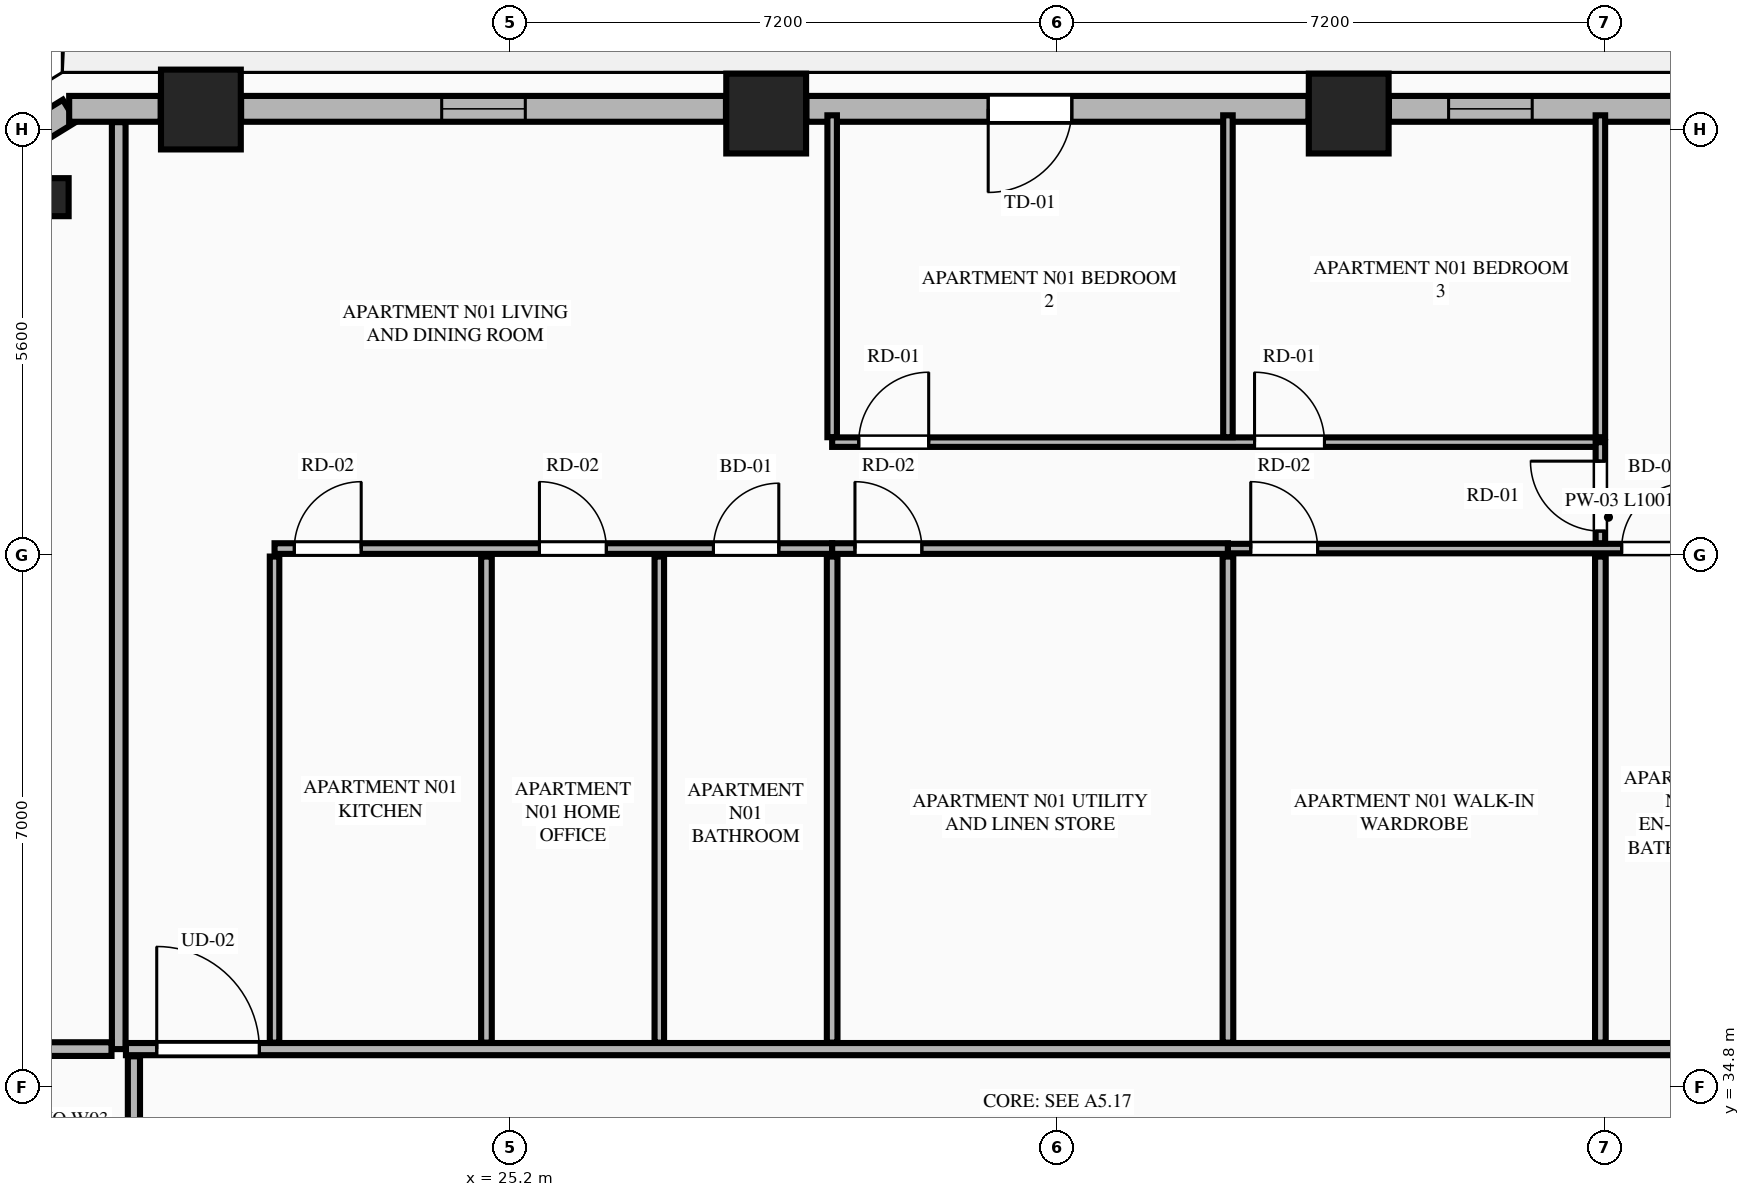
"""IFC4 building model, lengths in metres.
Left out: names, types, materials, properties, quantities, classifications, styles, units other than length and angle.
Written with IfcOpenShell. Run it as: python <this file> out.ifc"""

import sys

from ifc_helpers import new_model, si_unit, direction, frame, frame_2d, origin, origin_2d, place, context, subcontext, project, spatial, rectangle, extrude, element, fill, save


model = new_model("IFC4")
c1 = context("Model", 3, precision=1e-05, world=origin(), true_north=direction((0.0, 1.0)))
c2 = subcontext(c1, "Body", "Model", "MODEL_VIEW")
j1 = project(units=[si_unit("LENGTHUNIT", "METRE"), si_unit("PLANEANGLEUNIT", "RADIAN")], contexts=[c1])
p1 = place(None, origin())
s1 = spatial("IfcSite", under=j1, at=p1, CompositionType="ELEMENT")
p2 = place(p1, origin())
s2 = spatial("IfcBuilding", under=s1, at=p2, CompositionType="ELEMENT")
p3 = place(p2, frame((0.0, 0.0, 112.6)))
s3 = spatial("IfcBuildingStorey", under=s2, at=p3, CompositionType="ELEMENT", Elevation=112.6)
for number, where, z_axis, x_axis in (
    (1, (36.232, 47.608, 0.0), (0.0, 0.0, 1.0), (1.0, 0.0, 0.0)),
    (2, (28.568, 47.608, 0.0), (0.0, 0.0, 1.0), (1.0, 0.0, 0.0)),
    (3, (21.131, 47.661, 0.0), (0.0, 0.0, 1.0), (1.0, 0.0, 0.0)),
):
    element("IfcColumn", number, at=place(p3, frame(where, z_axis=z_axis, x_axis=x_axis)), inside=s3, PredefinedType="COLUMN", context=c2, shape_type="SweptSolid", body=[
        extrude(rectangle(XDim=1.05, YDim=1.05, at=origin_2d()), origin(), (0.0, 0.0, 1.0), 3.55),
    ])
p4 = place(p3, frame((19.141, 46.508, 0.0), z_axis=(0.0, 0.0, 1.0), x_axis=(-0.865160173452, -0.501495637342, 0.0)))
e4 = element("IfcColumn", 4, at=p4, inside=s3, PredefinedType="PILASTER", context=c2, shape_type="SweptSolid", body=[
    extrude(rectangle(XDim=0.5, YDim=0.35, at=origin_2d()), origin(), (0.0, 0.0, 1.0), 3.55),
])
p5 = place(p3, frame((19.403, 47.645, 0.0), z_axis=(0.0, 0.0, 1.0), x_axis=(-0.851798915137, -0.523868884523, 0.0)))
e5 = element("IfcWall", 5, at=p5, inside=s3, PredefinedType="STANDARD", context=c2, shape_type="SweptSolid", body=[
    extrude(rectangle(XDim=1.848, YDim=0.34, at=frame_2d((0.924, 0.0))), origin(), (0.0, 0.0, 1.0), 3.34),
])
p6 = place(p3, frame((43.14, 47.67, 0.0), z_axis=(0.0, 0.0, 1.0), x_axis=(-1.0, 0.0, 0.0)))
e6 = element("IfcWall", 6, at=p6, inside=s3, PredefinedType="STANDARD", context=c2, shape_type="SweptSolid", body=[
    extrude(rectangle(XDim=6.379, YDim=0.34, at=frame_2d((3.189, 0.0))), origin(), (0.0, 0.0, 1.0), 2.797),
])
p7 = place(p6, frame((1.192, 0.0, 0.75)))
e7 = element("IfcOpeningElement", 7, at=p7, cuts=e6, PredefinedType="OPENING", context=c2, shape_type="SweptSolid", body=[
    extrude(rectangle(XDim=1.1, YDim=1.897, at=frame_2d((0.55, 0.948))), frame((0.0, 0.18, 0.0), z_axis=(0.0, -1.0, 0.0), x_axis=(1.0, 0.0, 0.0)), (0.0, 0.0, 1.0), 0.36),
])
p8 = place(p6, frame((4.494, 0.0, 0.75)))
e8 = element("IfcOpeningElement", 8, at=p8, cuts=e6, PredefinedType="OPENING", context=c2, shape_type="SweptSolid", body=[
    extrude(rectangle(XDim=1.1, YDim=1.897, at=frame_2d((0.55, 0.948))), frame((0.0, 0.18, 0.0), z_axis=(0.0, -1.0, 0.0), x_axis=(1.0, 0.0, 0.0)), (0.0, 0.0, 1.0), 0.36),
])
p9 = place(p3, frame((35.703, 47.67, 0.0), z_axis=(0.0, 0.0, 1.0), x_axis=(-1.0, 0.0, 0.0)))
e9 = element("IfcWall", 9, at=p9, inside=s3, PredefinedType="STANDARD", context=c2, shape_type="SweptSolid", body=[
    extrude(rectangle(XDim=6.606, YDim=0.34, at=frame_2d((3.303, 0.0))), origin(), (0.0, 0.0, 1.0), 2.797),
])
p10 = place(p9, frame((3.114, 0.0, 0.0)))
e10 = element("IfcOpeningElement", 10, at=p10, cuts=e9, PredefinedType="OPENING", context=c2, shape_type="SweptSolid", body=[
    extrude(rectangle(XDim=1.1, YDim=2.25, at=frame_2d((0.55, 1.125))), frame((0.0, 0.18, 0.0), z_axis=(0.0, -1.0, 0.0), x_axis=(1.0, 0.0, 0.0)), (0.0, 0.0, 1.0), 0.36),
])
p11 = place(p3, frame((28.039, 47.67, 0.0), z_axis=(0.0, 0.0, 1.0), x_axis=(-1.0, 0.0, 0.0)))
e11 = element("IfcWall", 11, at=p11, inside=s3, PredefinedType="STANDARD", context=c2, shape_type="SweptSolid", body=[
    extrude(rectangle(XDim=6.379, YDim=0.34, at=frame_2d((3.189, 0.0))), origin(), (0.0, 0.0, 1.0), 2.797),
])
p12 = place(p11, frame((2.64, 0.0, 0.75)))
e12 = element("IfcOpeningElement", 12, at=p12, cuts=e11, PredefinedType="OPENING", context=c2, shape_type="SweptSolid", body=[
    extrude(rectangle(XDim=1.1, YDim=1.897, at=frame_2d((0.55, 0.948))), frame((0.0, 0.18, 0.0), z_axis=(0.0, -1.0, 0.0), x_axis=(1.0, 0.0, 0.0)), (0.0, 0.0, 1.0), 0.36),
])
p13 = place(p3, frame((20.602, 47.67, 0.0), z_axis=(0.0, 0.0, 1.0), x_axis=(-1.0, 0.0, 0.0)))
e13 = element("IfcWall", 13, at=p13, inside=s3, PredefinedType="STANDARD", context=c2, shape_type="SweptSolid", body=[
    extrude(rectangle(XDim=1.204, YDim=0.34, at=frame_2d((0.602, 0.0))), origin(), (0.0, 0.0, 1.0), 3.34),
])
p14 = place(p3, frame((20.05, 35.3, 0.0), z_axis=(0.0, 0.0, 1.0), x_axis=(0.0, 1.0, 0.0)))
e14 = element("IfcWall", 14, at=p14, inside=s3, PredefinedType="PARTITIONING", context=c2, shape_type="SweptSolid", body=[
    extrude(rectangle(XDim=12.195, YDim=0.18, at=frame_2d((6.098, 0.0))), origin(), (0.0, 0.0, 1.0), 3.34),
])
p15 = place(p3, frame((20.145, 35.3, 0.0), z_axis=(0.0, 0.0, 1.0), x_axis=(1.0, 0.0, 0.0)))
e15 = element("IfcWall", 15, at=p15, inside=s3, PredefinedType="PARTITIONING", context=c2, shape_type="SweptSolid", body=[
    extrude(rectangle(XDim=24.51, YDim=0.16, at=frame_2d((12.255, 0.0))), origin(), (0.0, 0.0, 1.0), 3.34),
])
p16 = place(p15, frame((0.405, 0.0, 0.0)))
e16 = element("IfcOpeningElement", 16, at=p16, cuts=e15, PredefinedType="OPENING", context=c2, shape_type="SweptSolid", body=[
    extrude(rectangle(XDim=1.35, YDim=2.35, at=frame_2d((0.675, 1.175))), frame((0.0, 0.09, 0.0), z_axis=(0.0, -1.0, 0.0), x_axis=(1.0, 0.0, 0.0)), (0.0, 0.0, 1.0), 0.18),
])
p17 = place(p3, frame((22.1, 35.385, 0.0), z_axis=(0.0, 0.0, 1.0), x_axis=(0.0, 1.0, 0.0)))
e17 = element("IfcWall", 17, at=p17, inside=s3, PredefinedType="PARTITIONING", context=c2, shape_type="SweptSolid", body=[
    extrude(rectangle(XDim=6.395, YDim=0.125, at=frame_2d((3.198, 0.0))), origin(), (0.0, 0.0, 1.0), 2.722),
])
p18 = place(p3, frame((22.1, 41.885, 0.0), z_axis=(0.0, 0.0, 1.0), x_axis=(1.0, 0.0, 0.0)))
e18 = element("IfcWall", 18, at=p18, inside=s3, PredefinedType="PLUMBINGWALL", context=c2, shape_type="SweptSolid", body=[
    extrude(rectangle(XDim=7.336, YDim=0.14, at=frame_2d((3.668, 0.0))), origin(), (0.0, 0.0, 1.0), 3.34),
])
p19 = place(p18, frame((5.774, 0.0, 0.0)))
e19 = element("IfcOpeningElement", 19, at=p19, cuts=e18, PredefinedType="OPENING", context=c2, shape_type="SweptSolid", body=[
    extrude(rectangle(XDim=0.86, YDim=2.1, at=frame_2d((0.43, 1.05))), frame((0.0, 0.08, 0.0), z_axis=(0.0, -1.0, 0.0), x_axis=(1.0, 0.0, 0.0)), (0.0, 0.0, 1.0), 0.16),
])
p20 = place(p18, frame((0.26, 0.0, 0.0)))
e20 = element("IfcOpeningElement", 20, at=p20, cuts=e18, PredefinedType="OPENING", context=c2, shape_type="SweptSolid", body=[
    extrude(rectangle(XDim=0.88, YDim=2.15, at=frame_2d((0.44, 1.075))), frame((0.0, 0.08, 0.0), z_axis=(0.0, -1.0, 0.0), x_axis=(1.0, 0.0, 0.0)), (0.0, 0.0, 1.0), 0.16),
])
p21 = place(p18, frame((3.485, 0.0, 0.0)))
e21 = element("IfcOpeningElement", 21, at=p21, cuts=e18, PredefinedType="OPENING", context=c2, shape_type="SweptSolid", body=[
    extrude(rectangle(XDim=0.88, YDim=2.15, at=frame_2d((0.44, 1.075))), frame((0.0, 0.08, 0.0), z_axis=(0.0, -1.0, 0.0), x_axis=(1.0, 0.0, 0.0)), (0.0, 0.0, 1.0), 0.16),
])
p22 = place(p3, frame((29.436, 41.885, 0.0), z_axis=(0.0, 0.0, 1.0), x_axis=(1.0, 0.0, 0.0)))
e22 = element("IfcWall", 22, at=p22, inside=s3, PredefinedType="PLUMBINGWALL", context=c2, shape_type="SweptSolid", body=[
    extrude(rectangle(XDim=5.207, YDim=0.14, at=frame_2d((2.604, 0.0))), origin(), (0.0, 0.0, 1.0), 3.34),
])
p23 = place(p22, frame((0.3, 0.0, 0.0)))
e23 = element("IfcOpeningElement", 23, at=p23, cuts=e22, PredefinedType="OPENING", context=c2, shape_type="SweptSolid", body=[
    extrude(rectangle(XDim=0.88, YDim=2.15, at=frame_2d((0.44, 1.075))), frame((0.0, 0.08, 0.0), z_axis=(0.0, -1.0, 0.0), x_axis=(1.0, 0.0, 0.0)), (0.0, 0.0, 1.0), 0.16),
])
p24 = place(p3, frame((34.643, 41.885, 0.0), z_axis=(0.0, 0.0, 1.0), x_axis=(1.0, 0.0, 0.0)))
e24 = element("IfcWall", 24, at=p24, inside=s3, PredefinedType="PARTITIONING", context=c2, shape_type="SweptSolid", body=[
    extrude(rectangle(XDim=10.012, YDim=0.125, at=frame_2d((5.006, 0.0))), origin(), (0.0, 0.0, 1.0), 3.34),
])
p25 = place(p24, frame((5.18, 0.0, 0.0)))
e25 = element("IfcOpeningElement", 25, at=p25, cuts=e24, PredefinedType="OPENING", context=c2, shape_type="SweptSolid", body=[
    extrude(rectangle(XDim=0.86, YDim=2.1, at=frame_2d((0.43, 1.05))), frame((0.0, 0.073, 0.0), z_axis=(0.0, -1.0, 0.0), x_axis=(1.0, 0.0, 0.0)), (0.0, 0.0, 1.0), 0.145),
])
p26 = place(p24, frame((7.328, 0.0, 0.0)))
e26 = element("IfcOpeningElement", 26, at=p26, cuts=e24, PredefinedType="OPENING", context=c2, shape_type="SweptSolid", body=[
    extrude(rectangle(XDim=0.88, YDim=2.15, at=frame_2d((0.44, 1.075))), frame((0.0, 0.073, 0.0), z_axis=(0.0, -1.0, 0.0), x_axis=(1.0, 0.0, 0.0)), (0.0, 0.0, 1.0), 0.145),
])
p27 = place(p24, frame((0.3, 0.0, 0.0)))
e27 = element("IfcOpeningElement", 27, at=p27, cuts=e24, PredefinedType="OPENING", context=c2, shape_type="SweptSolid", body=[
    extrude(rectangle(XDim=0.88, YDim=2.15, at=frame_2d((0.44, 1.075))), frame((0.0, 0.073, 0.0), z_axis=(0.0, -1.0, 0.0), x_axis=(1.0, 0.0, 0.0)), (0.0, 0.0, 1.0), 0.145),
])
p28 = place(p3, frame((24.888, 35.385, 0.0), z_axis=(0.0, 0.0, 1.0), x_axis=(0.0, 1.0, 0.0)))
e28 = element("IfcWall", 28, at=p28, inside=s3, PredefinedType="PLUMBINGWALL", context=c2, shape_type="SweptSolid", body=[
    extrude(rectangle(XDim=6.395, YDim=0.14, at=frame_2d((3.198, 0.0))), origin(), (0.0, 0.0, 1.0), 3.34),
])
p29 = place(p3, frame((27.162, 35.385, 0.0), z_axis=(0.0, 0.0, 1.0), x_axis=(0.0, 1.0, 0.0)))
e29 = element("IfcWall", 29, at=p29, inside=s3, PredefinedType="PARTITIONING", context=c2, shape_type="SweptSolid", body=[
    extrude(rectangle(XDim=6.395, YDim=0.125, at=frame_2d((3.198, 0.0))), origin(), (0.0, 0.0, 1.0), 3.34),
])
p30 = place(p3, frame((29.436, 43.35, 0.0), z_axis=(0.0, 0.0, 1.0), x_axis=(0.0, 1.0, 0.0)))
e30 = element("IfcWall", 30, at=p30, inside=s3, PredefinedType="PARTITIONING", context=c2, shape_type="SweptSolid", body=[
    extrude(rectangle(XDim=4.235, YDim=0.125, at=frame_2d((2.117, 0.0))), origin(), (0.0, 0.0, 1.0), 3.34),
])
p31 = place(p3, frame((29.436, 43.285, 0.0), z_axis=(0.0, 0.0, 1.0), x_axis=(1.0, 0.0, 0.0)))
e31 = element("IfcWall", 31, at=p31, inside=s3, PredefinedType="PARTITIONING", context=c2, shape_type="SweptSolid", body=[
    extrude(rectangle(XDim=10.107, YDim=0.125, at=frame_2d((5.053, 0.0))), origin(), (0.0, 0.0, 1.0), 3.34),
])
p32 = place(p31, frame((0.35, 0.0, 0.0)))
e32 = element("IfcOpeningElement", 32, at=p32, cuts=e31, PredefinedType="OPENING", context=c2, shape_type="SweptSolid", body=[
    extrude(rectangle(XDim=0.92, YDim=2.15, at=frame_2d((0.46, 1.075))), frame((0.0, 0.073, 0.0), z_axis=(0.0, -1.0, 0.0), x_axis=(1.0, 0.0, 0.0)), (0.0, 0.0, 1.0), 0.145),
])
p33 = place(p31, frame((5.557, 0.0, 0.0)))
e33 = element("IfcOpeningElement", 33, at=p33, cuts=e31, PredefinedType="OPENING", context=c2, shape_type="SweptSolid", body=[
    extrude(rectangle(XDim=0.92, YDim=2.15, at=frame_2d((0.46, 1.075))), frame((0.0, 0.073, 0.0), z_axis=(0.0, -1.0, 0.0), x_axis=(1.0, 0.0, 0.0)), (0.0, 0.0, 1.0), 0.145),
])
p34 = place(p3, frame((39.543, 41.955, 0.0), z_axis=(0.0, 0.0, 1.0), x_axis=(0.0, 1.0, 0.0)))
e34 = element("IfcWall", 34, at=p34, inside=s3, PredefinedType="PARTITIONING", context=c2, shape_type="SweptSolid", body=[
    extrude(rectangle(XDim=1.33, YDim=0.125, at=frame_2d((0.665, 0.0))), origin(), (0.0, 0.0, 1.0), 3.34),
])
p35 = place(p34, frame((0.16, 0.0, 0.0)))
e35 = element("IfcOpeningElement", 35, at=p35, cuts=e34, PredefinedType="OPENING", context=c2, shape_type="SweptSolid", body=[
    extrude(rectangle(XDim=0.92, YDim=2.15, at=frame_2d((0.46, 1.075))), frame((0.0, 0.073, 0.0), z_axis=(0.0, -1.0, 0.0), x_axis=(1.0, 0.0, 0.0)), (0.0, 0.0, 1.0), 0.145),
])
for number, where, z_axis, x_axis in (
    (36, (29.436, 35.385, 0.0), (0.0, 0.0, 1.0), (0.0, 1.0, 0.0)),
    (37, (34.643, 35.385, 0.0), (0.0, 0.0, 1.0), (0.0, 1.0, 0.0)),
):
    element("IfcWall", number, at=place(p3, frame(where, z_axis=z_axis, x_axis=x_axis)), inside=s3, PredefinedType="PLUMBINGWALL", context=c2, shape_type="SweptSolid", body=[
        extrude(rectangle(XDim=6.395, YDim=0.14, at=frame_2d((3.198, 0.0))), origin(), (0.0, 0.0, 1.0), 3.34),
    ])
for number, where, z_axis, x_axis in (
    (38, (34.643, 43.35, 0.0), (0.0, 0.0, 1.0), (0.0, 1.0, 0.0)),
    (39, (39.543, 43.35, 0.0), (0.0, 0.0, 1.0), (0.0, 1.0, 0.0)),
):
    element("IfcWall", number, at=place(p3, frame(where, z_axis=z_axis, x_axis=x_axis)), inside=s3, PredefinedType="PARTITIONING", context=c2, shape_type="SweptSolid", body=[
        extrude(rectangle(XDim=4.235, YDim=0.125, at=frame_2d((2.117, 0.0))), origin(), (0.0, 0.0, 1.0), 3.34),
    ])
p36 = place(p3, frame((39.543, 35.385, 0.0), z_axis=(0.0, 0.0, 1.0), x_axis=(0.0, 1.0, 0.0)))
e40 = element("IfcWall", 40, at=p36, inside=s3, PredefinedType="PLUMBINGWALL", context=c2, shape_type="SweptSolid", body=[
    extrude(rectangle(XDim=6.395, YDim=0.14, at=frame_2d((3.198, 0.0))), origin(), (0.0, 0.0, 1.0), 3.34),
])
p37 = place(p3, frame((12.286, 35.3, 0.0), z_axis=(0.0, 0.0, 1.0), x_axis=(1.0, 0.0, 0.0)))
e41 = element("IfcWall", 41, at=p37, inside=s3, PredefinedType="PARTITIONING", context=c2, shape_type="SweptSolid", body=[
    extrude(rectangle(XDim=7.669, YDim=0.18, at=frame_2d((3.834, 0.0))), origin(), (0.0, 0.0, 1.0), 3.34),
])
p38 = place(p3, frame((20.25, 29.379, 0.0), z_axis=(0.0, 0.0, 1.0), x_axis=(0.0, 1.0, 0.0)))
e42 = element("IfcWall", 42, at=p38, inside=s3, PredefinedType="PARTITIONING", context=c2, shape_type="SweptSolid", body=[
    extrude(rectangle(XDim=5.826, YDim=0.16, at=frame_2d((2.913, 0.0))), origin(), (0.0, 0.0, 1.0), 3.34),
])
p39 = place(p38, frame((0.4, 0.0, 0.0)))
e43 = element("IfcOpeningElement", 43, at=p39, cuts=e42, PredefinedType="OPENING", context=c2, shape_type="SweptSolid", body=[
    extrude(rectangle(XDim=1.02, YDim=2.25, at=frame_2d((0.51, 1.125))), frame((0.0, 0.09, 0.0), z_axis=(0.0, -1.0, 0.0), x_axis=(1.0, 0.0, 0.0)), (0.0, 0.0, 1.0), 0.18),
])
p40 = place(p10, origin())
e44 = element("IfcDoor", 44, at=p40, inside=s3, OperationType="SINGLE_SWING_RIGHT", PredefinedType="DOOR", context=c2, shape_type="SweptSolid", body=[
    extrude(rectangle(XDim=1.1, YDim=2.25, at=frame_2d((0.55, 1.125))), frame((0.0, 0.025, 0.0), z_axis=(0.0, -1.0, 0.0), x_axis=(1.0, 0.0, 0.0)), (0.0, 0.0, 1.0), 0.05),
])
fill(e10, e44)
p41 = place(p12, origin())
e45 = element("IfcWindow", 45, at=p41, inside=s3, PartitioningType="SINGLE_PANEL", PredefinedType="WINDOW", context=c2, shape_type="SweptSolid", body=[
    extrude(rectangle(XDim=1.1, YDim=1.897, at=frame_2d((0.55, 0.948))), frame((0.0, 0.03, 0.0), z_axis=(0.0, -1.0, 0.0), x_axis=(1.0, 0.0, 0.0)), (0.0, 0.0, 1.0), 0.06),
])
fill(e12, e45)
p42 = place(p19, origin())
e46 = element("IfcDoor", 46, at=p42, inside=s3, OperationType="SINGLE_SWING_RIGHT", PredefinedType="DOOR", context=c2, shape_type="SweptSolid", body=[
    extrude(rectangle(XDim=0.86, YDim=2.1, at=frame_2d((0.43, 1.05))), frame((0.0, 0.025, 0.0), z_axis=(0.0, -1.0, 0.0), x_axis=(1.0, 0.0, 0.0)), (0.0, 0.0, 1.0), 0.05),
])
fill(e19, e46)
p43 = place(p25, origin())
e47 = element("IfcDoor", 47, at=p43, inside=s3, OperationType="SINGLE_SWING_RIGHT", PredefinedType="DOOR", context=c2, shape_type="SweptSolid", body=[
    extrude(rectangle(XDim=0.86, YDim=2.1, at=frame_2d((0.43, 1.05))), frame((0.0, 0.025, 0.0), z_axis=(0.0, -1.0, 0.0), x_axis=(1.0, 0.0, 0.0)), (0.0, 0.0, 1.0), 0.05),
])
fill(e25, e47)
p44 = place(p16, origin())
e48 = element("IfcDoor", 48, at=p44, inside=s3, OperationType="SINGLE_SWING_LEFT", PredefinedType="DOOR", context=c2, shape_type="SweptSolid", body=[
    extrude(rectangle(XDim=1.35, YDim=2.35, at=frame_2d((0.675, 1.175))), frame((0.0, 0.025, 0.0), z_axis=(0.0, -1.0, 0.0), x_axis=(1.0, 0.0, 0.0)), (0.0, 0.0, 1.0), 0.05),
])
fill(e16, e48)
p45 = place(p20, origin())
e49 = element("IfcDoor", 49, at=p45, inside=s3, OperationType="SINGLE_SWING_RIGHT", PredefinedType="DOOR", context=c2, shape_type="SweptSolid", body=[
    extrude(rectangle(XDim=0.88, YDim=2.15, at=frame_2d((0.44, 1.075))), frame((0.0, 0.025, 0.0), z_axis=(0.0, -1.0, 0.0), x_axis=(1.0, 0.0, 0.0)), (0.0, 0.0, 1.0), 0.05),
])
fill(e20, e49)
p46 = place(p21, origin())
e50 = element("IfcDoor", 50, at=p46, inside=s3, OperationType="SINGLE_SWING_LEFT", PredefinedType="DOOR", context=c2, shape_type="SweptSolid", body=[
    extrude(rectangle(XDim=0.88, YDim=2.15, at=frame_2d((0.44, 1.075))), frame((0.0, 0.025, 0.0), z_axis=(0.0, -1.0, 0.0), x_axis=(1.0, 0.0, 0.0)), (0.0, 0.0, 1.0), 0.05),
])
fill(e21, e50)
p47 = place(p23, origin())
e51 = element("IfcDoor", 51, at=p47, inside=s3, OperationType="SINGLE_SWING_LEFT", PredefinedType="DOOR", context=c2, shape_type="SweptSolid", body=[
    extrude(rectangle(XDim=0.88, YDim=2.15, at=frame_2d((0.44, 1.075))), frame((0.0, 0.025, 0.0), z_axis=(0.0, -1.0, 0.0), x_axis=(1.0, 0.0, 0.0)), (0.0, 0.0, 1.0), 0.05),
])
fill(e23, e51)
p48 = place(p32, origin())
e52 = element("IfcDoor", 52, at=p48, inside=s3, OperationType="SINGLE_SWING_RIGHT", PredefinedType="DOOR", context=c2, shape_type="SweptSolid", body=[
    extrude(rectangle(XDim=0.92, YDim=2.15, at=frame_2d((0.46, 1.075))), frame((0.0, 0.025, 0.0), z_axis=(0.0, -1.0, 0.0), x_axis=(1.0, 0.0, 0.0)), (0.0, 0.0, 1.0), 0.05),
])
fill(e32, e52)
p49 = place(p33, origin())
e53 = element("IfcDoor", 53, at=p49, inside=s3, OperationType="SINGLE_SWING_LEFT", PredefinedType="DOOR", context=c2, shape_type="SweptSolid", body=[
    extrude(rectangle(XDim=0.92, YDim=2.15, at=frame_2d((0.46, 1.075))), frame((0.0, 0.025, 0.0), z_axis=(0.0, -1.0, 0.0), x_axis=(1.0, 0.0, 0.0)), (0.0, 0.0, 1.0), 0.05),
])
fill(e33, e53)
p50 = place(p35, origin())
e54 = element("IfcDoor", 54, at=p50, inside=s3, OperationType="SINGLE_SWING_RIGHT", PredefinedType="DOOR", context=c2, shape_type="SweptSolid", body=[
    extrude(rectangle(XDim=0.92, YDim=2.15, at=frame_2d((0.46, 1.075))), frame((0.0, 0.025, 0.0), z_axis=(0.0, -1.0, 0.0), x_axis=(1.0, 0.0, 0.0)), (0.0, 0.0, 1.0), 0.05),
])
fill(e35, e54)
p51 = place(p27, origin())
e55 = element("IfcDoor", 55, at=p51, inside=s3, OperationType="SINGLE_SWING_LEFT", PredefinedType="DOOR", context=c2, shape_type="SweptSolid", body=[
    extrude(rectangle(XDim=0.88, YDim=2.15, at=frame_2d((0.44, 1.075))), frame((0.0, 0.025, 0.0), z_axis=(0.0, -1.0, 0.0), x_axis=(1.0, 0.0, 0.0)), (0.0, 0.0, 1.0), 0.05),
])
fill(e27, e55)
p52 = place(p8, origin())
e56 = element("IfcWindow", 56, at=p52, inside=s3, PartitioningType="SINGLE_PANEL", PredefinedType="WINDOW", context=c2, shape_type="SweptSolid", body=[
    extrude(rectangle(XDim=1.1, YDim=1.897, at=frame_2d((0.55, 0.948))), frame((0.0, 0.03, 0.0), z_axis=(0.0, -1.0, 0.0), x_axis=(1.0, 0.0, 0.0)), (0.0, 0.0, 1.0), 0.06),
])
fill(e8, e56)
save(model, sys.argv[1])
